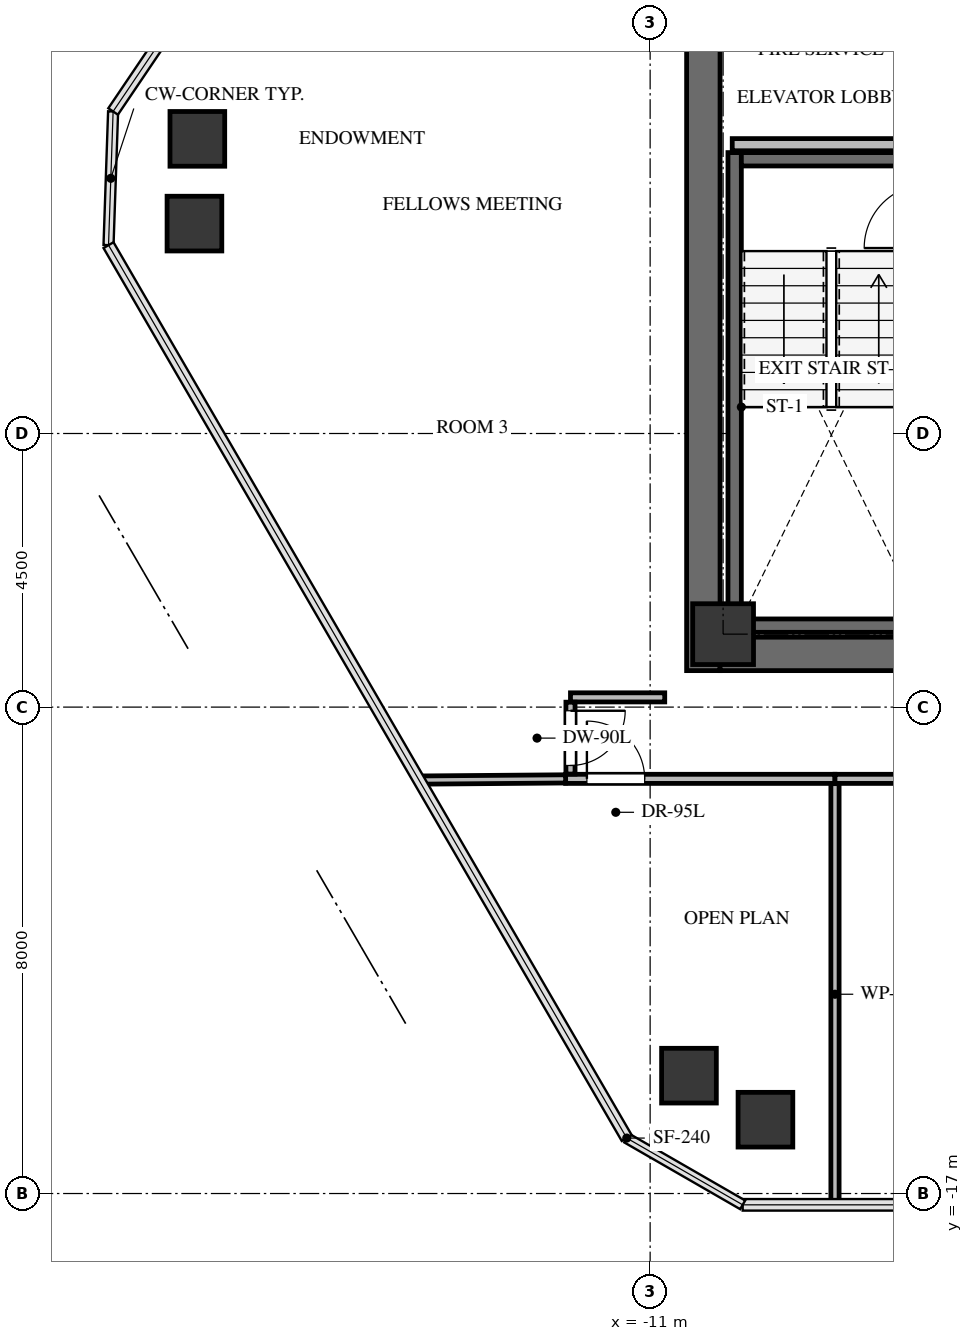
"""IFC4 building model, lengths in metres.
Left out: names, types, materials, properties, quantities, classifications, styles, units other than length and angle.
Written with IfcOpenShell. Run it as: python <this file> out.ifc"""

import sys

from ifc_helpers import new_model, si_unit, direction, frame, frame_2d, origin, origin_2d, place, context, subcontext, project, spatial, rectangle, extrude, source, transform, mapped, element, fill, save


model = new_model("IFC4")
c1 = context("Model", 3, precision=1e-05, world=origin(), true_north=direction((0.0, 1.0)))
c2 = subcontext(c1, "Body", "Model", "MODEL_VIEW")
j1 = project(units=[si_unit("LENGTHUNIT", "METRE"), si_unit("PLANEANGLEUNIT", "RADIAN")], contexts=[c1])
p1 = place(None, origin())
s1 = spatial("IfcSite", under=j1, at=p1, CompositionType="ELEMENT")
p2 = place(p1, origin())
s2 = spatial("IfcBuilding", under=s1, at=p2, CompositionType="ELEMENT")
p3 = place(p2, frame((0.0, 0.0, 258.1)))
s3 = spatial("IfcBuildingStorey", under=s2, at=p3, CompositionType="ELEMENT", Elevation=258.1)
p4 = place(p3, frame((-10.125, -8.4, 0.0), z_axis=(0.0, 0.0, 1.0), x_axis=(0.0, 1.0, 0.0)))
e1 = element("IfcWall", 1, at=p4, inside=s3, PredefinedType="SHEAR", context=c2, shape_type="SweptSolid", body=[
    extrude(rectangle(XDim=16.8, YDim=0.55, at=frame_2d((8.4, 0.0))), origin(), (0.0, 0.0, 1.0), 3.4),
])
p5 = place(p3, frame((-9.85, -8.125, 0.0), z_axis=(0.0, 0.0, 1.0), x_axis=(1.0, 0.0, 0.0)))
e2 = element("IfcWall", 2, at=p5, inside=s3, PredefinedType="SHEAR", context=c2, shape_type="SweptSolid", body=[
    extrude(rectangle(XDim=7.75, YDim=0.55, at=frame_2d((3.875, 0.0))), origin(), (0.0, 0.0, 1.0), 3.4),
])
p6 = place(p3, frame((-9.61, 0.12, -0.24), z_axis=(0.0, 0.0, 1.0), x_axis=(0.0, -1.0, 0.0)))
e3 = element("IfcWall", 3, at=p6, inside=s3, PredefinedType="SHEAR", context=c2, shape_type="SweptSolid", body=[
    extrude(rectangle(XDim=7.89, YDim=0.22, at=frame_2d((3.945, 0.0))), origin(), (0.0, 0.0, 1.0), 3.4),
])
for number, where, z_axis, x_axis in (
    (4, (-9.5, -7.66, -0.24), (0.0, 0.0, 1.0), (1.0, 0.0, 0.0)),
    (5, (-6.54, 0.01, -0.24), (0.0, 0.0, 1.0), (-1.0, 0.0, 0.0)),
):
    element("IfcWall", number, at=place(p3, frame(where, z_axis=z_axis, x_axis=x_axis)), inside=s3, PredefinedType="SHEAR", context=c2, shape_type="SweptSolid", body=[
        extrude(rectangle(XDim=2.96, YDim=0.22, at=frame_2d((1.48, 0.0))), origin(), (0.0, 0.0, 1.0), 3.4),
    ])
m1 = source(origin(), c2, "Body", "SweptSolid", [
    extrude(rectangle(XDim=1.0, YDim=1.0, at=origin_2d()), origin(), (0.0, 0.0, 1.0), 3.4),
])
p7 = place(p3, frame((-9.8, -7.8, -0.24), z_axis=(0.0, 0.0, 1.0), x_axis=(1.0, 0.0, 0.0)))
e6 = element("IfcColumn", 6, at=p7, inside=s3, PredefinedType="COLUMN", context=c2, shape_type="MappedRepresentation", body=[
    mapped(m1, transform((0.0, 0.0, 0.0), x_axis=(1.0, 0.0, 0.0), y_axis=(0.0, 1.0, 0.0), z_axis=(0.0, 0.0, 1.0), scale=1.0)),
])
m2 = source(origin(), c2, "Body", "SweptSolid", [
    extrude(rectangle(XDim=0.9, YDim=0.9, at=origin_2d()), origin(), (0.0, 0.0, 1.0), 3.4),
])
for number, where, z_axis, x_axis in (
    (7, (-10.361, -15.062, -0.24), (0.0, 0.0, 1.0), (1.0, 0.0, 0.0)),
    (8, (-18.494, -1.048, -0.24), (0.0, 0.0, 1.0), (1.0, 0.0, 0.0)),
    (9, (-18.446, 0.346, -0.24), (0.0, 0.0, 1.0), (1.0, 0.0, 0.0)),
    (10, (-9.104, -15.786, -0.24), (0.0, 0.0, 1.0), (1.0, 0.0, 0.0)),
):
    element("IfcColumn", number, at=place(p3, frame(where, z_axis=z_axis, x_axis=x_axis)), inside=s3, PredefinedType="COLUMN", context=c2, shape_type="MappedRepresentation", body=[
        mapped(m2, transform((0.0, 0.0, 0.0), x_axis=(1.0, 0.0, 0.0), y_axis=(0.0, 1.0, 0.0), z_axis=(0.0, 0.0, 1.0), scale=1.0)),
    ])
p8 = place(p3, frame((-9.65, 0.25, 0.0), z_axis=(0.0, 0.0, 1.0), x_axis=(1.0, 0.0, 0.0)))
e11 = element("IfcWall", 11, at=p8, inside=s3, PredefinedType="SOLIDWALL", context=c2, shape_type="SweptSolid", body=[
    extrude(rectangle(XDim=4.27, YDim=0.2, at=frame_2d((2.135, 0.0))), origin(), (0.0, 0.0, 1.0), 3.145),
])
p9 = place(p3, frame((-12.39, -10.18, 0.0), z_axis=(0.0, 0.0, 1.0), x_axis=(1.0, 0.0, 0.0)))
e12 = element("IfcWall", 12, at=p9, inside=s3, PredefinedType="PARTITIONING", context=c2, shape_type="SweptSolid", body=[
    extrude(rectangle(XDim=4.43, YDim=0.15, at=frame_2d((2.215, 0.0))), origin(), (0.0, 0.0, 1.0), 3.145),
])
p10 = place(p9, frame((0.35, 0.0, 0.0)))
e13 = element("IfcOpeningElement", 13, at=p10, cuts=e12, PredefinedType="OPENING", context=c2, shape_type="SweptSolid", body=[
    extrude(rectangle(XDim=0.95, YDim=2.1, at=frame_2d((0.475, 1.05))), frame((0.0, 0.085, 0.0), z_axis=(0.0, -1.0, 0.0), x_axis=(1.0, 0.0, 0.0)), (0.0, 0.0, 1.0), 0.17),
])
p11 = place(p3, frame((-7.96, -10.18, 0.0), z_axis=(0.0, 0.0, 1.0), x_axis=(1.0, 0.0, 0.0)))
e14 = element("IfcWall", 14, at=p11, inside=s3, PredefinedType="PARTITIONING", context=c2, shape_type="SweptSolid", body=[
    extrude(rectangle(XDim=5.5, YDim=0.15, at=frame_2d((2.75, 0.0))), origin(), (0.0, 0.0, 1.0), 2.401),
])
p12 = place(p11, frame((2.29, 0.0, 0.0)))
e15 = element("IfcOpeningElement", 15, at=p12, cuts=e14, PredefinedType="OPENING", context=c2, shape_type="SweptSolid", body=[
    extrude(rectangle(XDim=0.92, YDim=2.1, at=frame_2d((0.46, 1.05))), frame((0.0, 0.085, 0.0), z_axis=(0.0, -1.0, 0.0), x_axis=(1.0, 0.0, 0.0)), (0.0, 0.0, 1.0), 0.17),
])
p13 = place(p3, frame((-10.76, -8.84, 0.0), z_axis=(0.0, 0.0, 1.0), x_axis=(-1.0, 0.0, 0.0)))
e16 = element("IfcWall", 16, at=p13, inside=s3, PredefinedType="PARTITIONING", context=c2, shape_type="SweptSolid", body=[
    extrude(rectangle(XDim=1.55, YDim=0.15, at=frame_2d((0.775, 0.0))), origin(), (0.0, 0.0, 1.0), 3.145),
])
p14 = place(p3, frame((-12.31, -8.919, 0.0), z_axis=(0.0, 0.0, 1.0), x_axis=(0.0, -1.0, 0.0)))
e17 = element("IfcWall", 17, at=p14, inside=s3, PredefinedType="PARTITIONING", context=c2, shape_type="SweptSolid", body=[
    extrude(rectangle(XDim=1.182, YDim=0.15, at=frame_2d((0.591, 0.0))), origin(), (0.0, 0.0, 1.0), 3.145),
])
p15 = place(p14, frame((0.141, 0.0, 0.0)))
e18 = element("IfcOpeningElement", 18, at=p15, cuts=e17, PredefinedType="OPENING", context=c2, shape_type="SweptSolid", body=[
    extrude(rectangle(XDim=0.9, YDim=2.05, at=frame_2d((0.45, 1.025))), frame((0.0, 0.085, 0.0), z_axis=(0.0, -1.0, 0.0), x_axis=(1.0, 0.0, 0.0)), (0.0, 0.0, 1.0), 0.17),
])
p16 = place(p3, frame((-7.96, -10.259, 0.0), z_axis=(0.0, 0.0, 1.0), x_axis=(0.0, -1.0, 0.0)))
e19 = element("IfcWall", 19, at=p16, inside=s3, PredefinedType="PARTITIONING", context=c2, shape_type="SweptSolid", body=[
    extrude(rectangle(XDim=6.927, YDim=0.135, at=frame_2d((3.463, 0.0))), origin(), (0.0, 0.0, 1.0), 2.401),
])
p17 = place(p3, frame((-14.802, -10.2, 0.0), z_axis=(0.0, 0.0, 1.0), x_axis=(0.999968020968, 0.007997314604, 0.0)))
e20 = element("IfcWall", 20, at=p17, inside=s3, PredefinedType="PARTITIONING", context=c2, shape_type="SweptSolid", body=[
    extrude(rectangle(XDim=2.412, YDim=0.135, at=frame_2d((1.206, 0.0))), origin(), (0.0, 0.0, 1.0), 2.499),
])
m3 = source(origin(), c2, "Body", "SweptSolid", [
    extrude(rectangle(XDim=0.95, YDim=2.1, at=frame_2d((0.475, 1.05))), frame((0.0, 0.025, 0.0), z_axis=(0.0, -1.0, 0.0), x_axis=(1.0, 0.0, 0.0)), (0.0, 0.0, 1.0), 0.05),
])
p18 = place(p10, origin())
e21 = element("IfcDoor", 21, at=p18, inside=s3, OperationType="SINGLE_SWING_LEFT", PredefinedType="DOOR", context=c2, shape_type="MappedRepresentation", body=[
    mapped(m3, transform((0.0, 0.0, 0.0), x_axis=(1.0, 0.0, 0.0), y_axis=(0.0, 1.0, 0.0), z_axis=(0.0, 0.0, 1.0), scale=1.0)),
])
fill(e13, e21)
m4 = source(origin(), c2, "Body", "SweptSolid", [
    extrude(rectangle(XDim=0.9, YDim=2.05, at=frame_2d((0.45, 1.025))), frame((0.0, 0.025, 0.0), z_axis=(0.0, -1.0, 0.0), x_axis=(1.0, 0.0, 0.0)), (0.0, 0.0, 1.0), 0.05),
])
p19 = place(p15, origin())
e22 = element("IfcDoor", 22, at=p19, inside=s3, OperationType="SINGLE_SWING_LEFT", PredefinedType="DOOR", context=c2, shape_type="MappedRepresentation", body=[
    mapped(m4, transform((0.0, 0.0, 0.0), x_axis=(1.0, 0.0, 0.0), y_axis=(0.0, 1.0, 0.0), z_axis=(0.0, 0.0, 1.0), scale=1.0)),
])
fill(e18, e22)
save(model, sys.argv[1])
